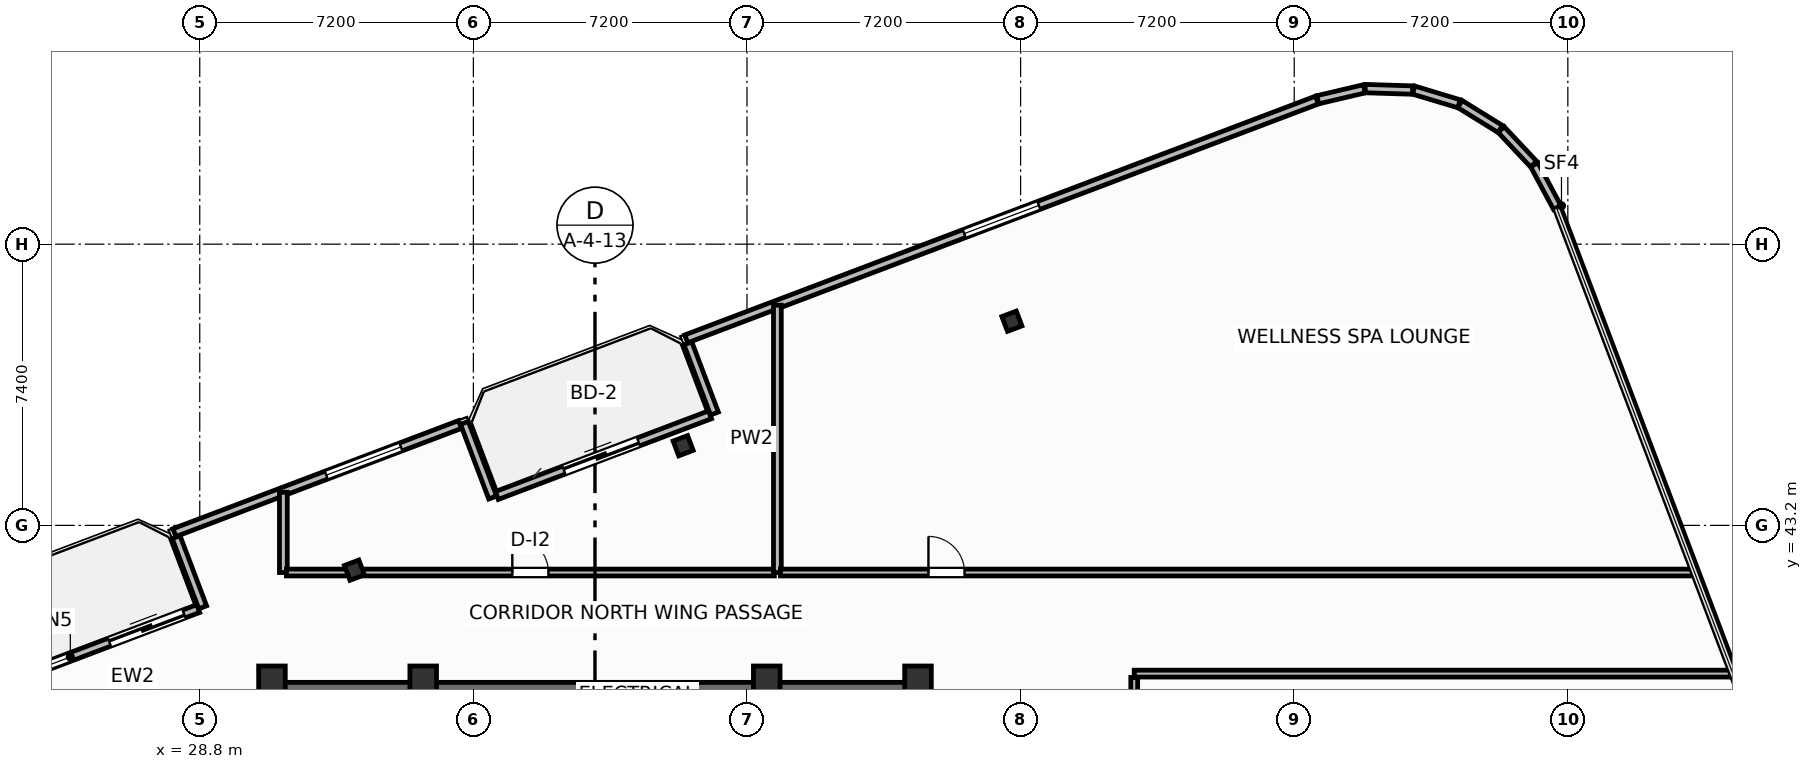
"""IFC4 building model, lengths in metres.
Left out: names, types, materials, properties, quantities, classifications, styles, units other than length and angle.
Written with IfcOpenShell. Run it as: python <this file> out.ifc"""

import sys

from ifc_helpers import new_model, si_unit, direction, frame, frame_2d, origin, origin_2d, place, context, subcontext, project, spatial, rectangle, i_section, extrude, element, fill, save


model = new_model("IFC4")
c1 = context("Model", 3, precision=1e-05, world=origin(), true_north=direction((0.0, 1.0)))
c2 = subcontext(c1, "Body", "Model", "MODEL_VIEW")
j1 = project(units=[si_unit("LENGTHUNIT", "METRE"), si_unit("PLANEANGLEUNIT", "RADIAN")], contexts=[c1])
p1 = place(None, origin())
s1 = spatial("IfcSite", under=j1, at=p1, CompositionType="ELEMENT")
p2 = place(p1, origin())
s2 = spatial("IfcBuilding", under=s1, at=p2, CompositionType="ELEMENT")
p3 = place(p2, frame((0.0, 0.0, 246.0)))
s3 = spatial("IfcBuildingStorey", under=s2, at=p3, CompositionType="ELEMENT", Elevation=246.0)
for number, where, z_axis, x_axis in (
    (1, (30.7, 39.05, 0.0), (0.0, 0.0, 1.0), (1.0, 0.0, 0.0)),
    (2, (34.68, 39.05, 0.0), (0.0, 0.0, 1.0), (1.0, 0.0, 0.0)),
    (3, (43.72, 39.05, 0.0), (0.0, 0.0, 1.0), (1.0, 0.0, 0.0)),
    (4, (47.7, 39.05, 0.0), (0.0, 0.0, 1.0), (1.0, 0.0, 0.0)),
):
    element("IfcColumn", number, at=place(p3, frame(where, z_axis=z_axis, x_axis=x_axis)), inside=s3, PredefinedType="COLUMN", context=c2, shape_type="SweptSolid", body=[
        extrude(rectangle(XDim=0.7, YDim=0.9, at=origin_2d()), origin(), (0.0, 0.0, 1.0), 3.7),
    ])
p4 = place(p3, frame((30.48, 38.745, 0.0), z_axis=(0.0, 0.0, 1.0), x_axis=(1.0, 0.0, 0.0)))
e5 = element("IfcWall", 5, at=p4, inside=s3, PredefinedType="SHEAR", context=c2, shape_type="SweptSolid", body=[
    extrude(rectangle(XDim=17.44, YDim=0.65, at=frame_2d((8.72, 0.0))), origin(), (0.0, 0.0, 1.0), 3.45),
])
for number, where, z_axis, x_axis in (
    (6, (50.171, 48.572, 0.0), (0.0, 0.0, 1.0), (0.935, 0.354, 0.0)),
    (7, (41.52, 45.297, 0.0), (0.0, 0.0, 1.0), (0.935, 0.354, 0.0)),
    (8, (32.869, 42.022, 0.0), (0.0, 0.0, 1.0), (0.935, 0.354, 0.0)),
):
    element("IfcColumn", number, at=place(p3, frame(where, z_axis=z_axis, x_axis=x_axis)), inside=s3, PredefinedType="COLUMN", context=c2, shape_type="SweptSolid", body=[
        extrude(i_section(OverallWidth=0.406, OverallDepth=0.416, WebThickness=0.03, FlangeThickness=0.048, FilletRadius=0.025, at=origin_2d()), origin(), (0.0, 0.0, 1.0), 3.7),
    ])
p5 = place(p3, frame((23.149, 38.887, 0.0), z_axis=(0.0, 0.0, 1.0), x_axis=(0.9352192676, 0.354069091436, 0.0)))
e9 = element("IfcWall", 9, at=p5, inside=s3, PredefinedType="SOLIDWALL", context=c2, shape_type="SweptSolid", body=[
    extrude(rectangle(XDim=6.0, YDim=0.22, at=frame_2d((3.0, 0.0))), origin(), (0.0, 0.0, 1.0), 2.73),
])
p6 = place(p5, frame((3.5, 0.0, 0.0)))
e10 = element("IfcOpeningElement", 10, at=p6, cuts=e9, PredefinedType="OPENING", context=c2, shape_type="SweptSolid", body=[
    extrude(rectangle(XDim=2.1, YDim=2.3, at=frame_2d((1.05, 1.15))), frame((0.0, 0.12, 0.0), z_axis=(0.0, -1.0, 0.0), x_axis=(1.0, 0.0, 0.0)), (0.0, 0.0, 1.0), 0.24),
])
p7 = place(p5, frame((0.55, 0.0, 0.75)))
e11 = element("IfcOpeningElement", 11, at=p7, cuts=e9, PredefinedType="OPENING", context=c2, shape_type="SweptSolid", body=[
    extrude(rectangle(XDim=1.85, YDim=1.75, at=frame_2d((0.925, 0.875))), frame((0.0, 0.12, 0.0), z_axis=(0.0, -1.0, 0.0), x_axis=(1.0, 0.0, 0.0)), (0.0, 0.0, 1.0), 0.24),
])
p8 = place(p3, frame((36.617, 43.986, 0.0), z_axis=(0.0, 0.0, 1.0), x_axis=(0.935227640088, 0.354046976001, 0.0)))
e12 = element("IfcWall", 12, at=p8, inside=s3, PredefinedType="SOLIDWALL", context=c2, shape_type="SweptSolid", body=[
    extrude(rectangle(XDim=6.0, YDim=0.22, at=frame_2d((3.0, 0.0))), origin(), (0.0, 0.0, 1.0), 2.73),
])
p9 = place(p8, frame((1.888, 0.0, 0.0)))
e13 = element("IfcOpeningElement", 13, at=p9, cuts=e12, PredefinedType="OPENING", context=c2, shape_type="SweptSolid", body=[
    extrude(rectangle(XDim=2.1, YDim=2.3, at=frame_2d((1.05, 1.15))), frame((0.0, 0.12, 0.0), z_axis=(0.0, -1.0, 0.0), x_axis=(1.0, 0.0, 0.0)), (0.0, 0.0, 1.0), 0.24),
])
p10 = place(p3, frame((64.519, 51.566, 0.0), z_axis=(0.0, 0.0, 1.0), x_axis=(-0.473093575122, 0.881012184466, 0.0)))
e14 = element("IfcWall", 14, at=p10, inside=s3, PredefinedType="SOLIDWALL", context=c2, shape_type="SweptSolid", body=[
    extrude(rectangle(XDim=1.274, YDim=0.22, at=frame_2d((0.637, 0.0))), origin(), (0.0, 0.0, 1.0), 2.73),
])
for number, where, z_axis, x_axis in (
    (15, (63.899, 52.706, 0.0), (0.0, 0.0, 1.0), (-0.685, 0.729, 0.0)),
    (16, (63.023, 53.629, 0.0), (0.0, 0.0, 1.0), (-0.85, 0.526, 0.0)),
):
    element("IfcWall", number, at=place(p3, frame(where, z_axis=z_axis, x_axis=x_axis)), inside=s3, PredefinedType="SOLIDWALL", context=c2, shape_type="SweptSolid", body=[
        extrude(rectangle(XDim=1.249, YDim=0.22, at=frame_2d((0.625, 0.0))), origin(), (0.0, 0.0, 1.0), 2.73),
    ])
for number, where, z_axis, x_axis in (
    (17, (61.937, 54.294, 0.0), (0.0, 0.0, 1.0), (-0.958, 0.288, 0.0)),
    (18, (60.717, 54.655, 0.0), (0.0, 0.0, 1.0), (-1.0, 0.031, 0.0)),
):
    element("IfcWall", number, at=place(p3, frame(where, z_axis=z_axis, x_axis=x_axis)), inside=s3, PredefinedType="SOLIDWALL", context=c2, shape_type="SweptSolid", body=[
        extrude(rectangle(XDim=1.249, YDim=0.22, at=frame_2d((0.624, 0.0))), origin(), (0.0, 0.0, 1.0), 2.73),
    ])
p11 = place(p3, frame((59.444, 54.688, 0.0), z_axis=(0.0, 0.0, 1.0), x_axis=(-0.973409523464, -0.229071821989, 0.0)))
e19 = element("IfcWall", 19, at=p11, inside=s3, PredefinedType="SOLIDWALL", context=c2, shape_type="SweptSolid", body=[
    extrude(rectangle(XDim=1.257, YDim=0.22, at=frame_2d((0.628, 0.0))), origin(), (0.0, 0.0, 1.0), 2.73),
])
p12 = place(p3, frame((58.198, 54.391, 0.0), z_axis=(0.0, 0.0, 1.0), x_axis=(-0.935223849772, -0.354056988094, 0.0)))
e20 = element("IfcWall", 20, at=p12, inside=s3, PredefinedType="SOLIDWALL", context=c2, shape_type="SweptSolid", body=[
    extrude(rectangle(XDim=17.747, YDim=0.22, at=frame_2d((8.874, 0.0))), origin(), (0.0, 0.0, 1.0), 2.73),
])
p13 = place(p12, frame((7.823, 0.0, 0.8)))
e21 = element("IfcOpeningElement", 21, at=p13, cuts=e20, PredefinedType="OPENING", context=c2, shape_type="SweptSolid", body=[
    extrude(rectangle(XDim=2.1, YDim=1.75, at=frame_2d((1.05, 0.875))), frame((0.0, 0.12, 0.0), z_axis=(0.0, -1.0, 0.0), x_axis=(1.0, 0.0, 0.0)), (0.0, 0.0, 1.0), 0.24),
])
p14 = place(p3, frame((41.645, 47.99, 0.0), z_axis=(0.0, 0.0, 1.0), x_axis=(0.354020680661, -0.935237594232, 0.0)))
e22 = element("IfcWall", 22, at=p14, inside=s3, PredefinedType="SOLIDWALL", context=c2, shape_type="SweptSolid", body=[
    extrude(rectangle(XDim=1.975, YDim=0.22, at=frame_2d((0.988, 0.0))), origin(), (0.0, 0.0, 1.0), 2.73),
])
p15 = place(p3, frame((36.508, 43.934, 0.0), z_axis=(0.0, 0.0, 1.0), x_axis=(-0.354128469405, 0.935196785258, 0.0)))
e23 = element("IfcWall", 23, at=p15, inside=s3, PredefinedType="SOLIDWALL", context=c2, shape_type="SweptSolid", body=[
    extrude(rectangle(XDim=2.1, YDim=0.22, at=frame_2d((1.05, 0.0))), origin(), (0.0, 0.0, 1.0), 2.73),
])
p16 = place(p3, frame((35.648, 45.854, 0.0), z_axis=(0.0, 0.0, 1.0), x_axis=(-0.935230796934, -0.354038636968, 0.0)))
e24 = element("IfcWall", 24, at=p16, inside=s3, PredefinedType="SOLIDWALL", context=c2, shape_type="SweptSolid", body=[
    extrude(rectangle(XDim=8.035, YDim=0.22, at=frame_2d((4.018, 0.0))), origin(), (0.0, 0.0, 1.0), 2.73),
])
p17 = place(p16, frame((1.662, 0.0, 0.8)))
e25 = element("IfcOpeningElement", 25, at=p17, cuts=e24, PredefinedType="OPENING", context=c2, shape_type="SweptSolid", body=[
    extrude(rectangle(XDim=2.1, YDim=1.75, at=frame_2d((1.05, 0.875))), frame((0.0, 0.12, 0.0), z_axis=(0.0, -1.0, 0.0), x_axis=(1.0, 0.0, 0.0)), (0.0, 0.0, 1.0), 0.24),
])
p18 = place(p3, frame((28.177, 42.892, 0.0), z_axis=(0.0, 0.0, 1.0), x_axis=(0.354061611705, -0.935222099352, 0.0)))
e26 = element("IfcWall", 26, at=p18, inside=s3, PredefinedType="SOLIDWALL", context=c2, shape_type="SweptSolid", body=[
    extrude(rectangle(XDim=1.975, YDim=0.22, at=frame_2d((0.987, 0.0))), origin(), (0.0, 0.0, 1.0), 2.73),
])
p19 = place(p3, frame((31.0, 41.96, 0.0), z_axis=(0.0, 0.0, 1.0), x_axis=(0.0, 1.0, 0.0)))
e27 = element("IfcWall", 27, at=p19, inside=s3, PredefinedType="PARTITIONING", context=c2, shape_type="SweptSolid", body=[
    extrude(rectangle(XDim=2.113, YDim=0.205, at=frame_2d((1.056, 0.0))), origin(), (0.0, 0.0, 1.0), 3.45),
])
p20 = place(p3, frame((31.08, 41.96, 0.0), z_axis=(0.0, 0.0, 1.0), x_axis=(1.0, 0.0, 0.0)))
e28 = element("IfcWall", 28, at=p20, inside=s3, PredefinedType="PARTITIONING", context=c2, shape_type="SweptSolid", body=[
    extrude(rectangle(XDim=12.84, YDim=0.18, at=frame_2d((6.42, 0.0))), origin(), (0.0, 0.0, 1.0), 3.018),
])
p21 = place(p20, frame((5.945, 0.0, 0.0)))
e29 = element("IfcOpeningElement", 29, at=p21, cuts=e28, PredefinedType="OPENING", context=c2, shape_type="SweptSolid", body=[
    extrude(rectangle(XDim=0.95, YDim=2.05, at=frame_2d((0.475, 1.025))), frame((0.0, 0.1, 0.0), z_axis=(0.0, -1.0, 0.0), x_axis=(1.0, 0.0, 0.0)), (0.0, 0.0, 1.0), 0.2),
])
p22 = place(p3, frame((44.0, 41.96, 0.0), z_axis=(0.0, 0.0, 1.0), x_axis=(0.0, 1.0, 0.0)))
e30 = element("IfcWall", 30, at=p22, inside=s3, PredefinedType="PARTITIONING", context=c2, shape_type="SweptSolid", body=[
    extrude(rectangle(XDim=7.034, YDim=0.205, at=frame_2d((3.517, 0.0))), origin(), (0.0, 0.0, 1.0), 3.45),
])
p23 = place(p3, frame((44.08, 41.96, 0.0), z_axis=(0.0, 0.0, 1.0), x_axis=(1.0, 0.0, 0.0)))
e31 = element("IfcWall", 31, at=p23, inside=s3, PredefinedType="PARTITIONING", context=c2, shape_type="SweptSolid", body=[
    extrude(rectangle(XDim=24.016, YDim=0.18, at=frame_2d((12.008, 0.0))), origin(), (0.0, 0.0, 1.0), 3.45),
])
p24 = place(p23, frame((3.895, 0.0, 0.0)))
e32 = element("IfcOpeningElement", 32, at=p24, cuts=e31, PredefinedType="OPENING", context=c2, shape_type="SweptSolid", body=[
    extrude(rectangle(XDim=0.95, YDim=2.05, at=frame_2d((0.475, 1.025))), frame((0.0, 0.1, 0.0), z_axis=(0.0, -1.0, 0.0), x_axis=(1.0, 0.0, 0.0)), (0.0, 0.0, 1.0), 0.2),
])
p25 = place(p3, frame((53.39, 27.53, 0.0), z_axis=(0.0, 0.0, 1.0), x_axis=(0.0, 1.0, 0.0)))
e33 = element("IfcWall", 33, at=p25, inside=s3, PredefinedType="PARTITIONING", context=c2, shape_type="SweptSolid", body=[
    extrude(rectangle(XDim=11.67, YDim=0.18, at=frame_2d((5.835, 0.0))), origin(), (0.0, 0.0, 1.0), 3.45),
])
p26 = place(p25, frame((5.8, 0.0, 0.0)))
e34 = element("IfcOpeningElement", 34, at=p26, cuts=e33, PredefinedType="OPENING", context=c2, shape_type="SweptSolid", body=[
    extrude(rectangle(XDim=0.92, YDim=2.05, at=frame_2d((0.46, 1.025))), frame((0.0, 0.1, 0.0), z_axis=(0.0, -1.0, 0.0), x_axis=(1.0, 0.0, 0.0)), (0.0, 0.0, 1.0), 0.2),
])
p27 = place(p3, frame((53.39, 39.3, 0.0), z_axis=(0.0, 0.0, 1.0), x_axis=(1.0, 0.0, 0.0)))
e35 = element("IfcWall", 35, at=p27, inside=s3, PredefinedType="PARTITIONING", context=c2, shape_type="SweptSolid", body=[
    extrude(rectangle(XDim=15.713, YDim=0.18, at=frame_2d((7.856, 0.0))), origin(), (0.0, 0.0, 1.0), 3.45),
])
p28 = place(p6, origin())
e36 = element("IfcDoor", 36, at=p28, inside=s3, OperationType="SLIDING_TO_LEFT", PredefinedType="DOOR", context=c2, shape_type="SweptSolid", body=[
    extrude(rectangle(XDim=2.1, YDim=2.3, at=frame_2d((1.05, 1.15))), frame((0.0, 0.025, 0.0), z_axis=(0.0, -1.0, 0.0), x_axis=(1.0, 0.0, 0.0)), (0.0, 0.0, 1.0), 0.05),
])
fill(e10, e36)
p29 = place(p7, origin())
e37 = element("IfcWindow", 37, at=p29, inside=s3, PartitioningType="SINGLE_PANEL", PredefinedType="WINDOW", context=c2, shape_type="SweptSolid", body=[
    extrude(rectangle(XDim=1.85, YDim=1.75, at=frame_2d((0.925, 0.875))), frame((0.0, 0.03, 0.0), z_axis=(0.0, -1.0, 0.0), x_axis=(1.0, 0.0, 0.0)), (0.0, 0.0, 1.0), 0.06),
])
fill(e11, e37)
p30 = place(p9, origin())
e38 = element("IfcDoor", 38, at=p30, inside=s3, OperationType="SLIDING_TO_LEFT", PredefinedType="DOOR", context=c2, shape_type="SweptSolid", body=[
    extrude(rectangle(XDim=2.1, YDim=2.3, at=frame_2d((1.05, 1.15))), frame((0.0, 0.025, 0.0), z_axis=(0.0, -1.0, 0.0), x_axis=(1.0, 0.0, 0.0)), (0.0, 0.0, 1.0), 0.05),
])
fill(e13, e38)
p31 = place(p13, origin())
e39 = element("IfcWindow", 39, at=p31, inside=s3, PartitioningType="SINGLE_PANEL", PredefinedType="WINDOW", context=c2, shape_type="SweptSolid", body=[
    extrude(rectangle(XDim=2.1, YDim=1.75, at=frame_2d((1.05, 0.875))), frame((0.0, 0.03, 0.0), z_axis=(0.0, -1.0, 0.0), x_axis=(1.0, 0.0, 0.0)), (0.0, 0.0, 1.0), 0.06),
])
fill(e21, e39)
p32 = place(p17, origin())
e40 = element("IfcWindow", 40, at=p32, inside=s3, PartitioningType="SINGLE_PANEL", PredefinedType="WINDOW", context=c2, shape_type="SweptSolid", body=[
    extrude(rectangle(XDim=2.1, YDim=1.75, at=frame_2d((1.05, 0.875))), frame((0.0, 0.03, 0.0), z_axis=(0.0, -1.0, 0.0), x_axis=(1.0, 0.0, 0.0)), (0.0, 0.0, 1.0), 0.06),
])
fill(e25, e40)
p33 = place(p21, origin())
e41 = element("IfcDoor", 41, at=p33, inside=s3, OperationType="SINGLE_SWING_LEFT", PredefinedType="DOOR", context=c2, shape_type="SweptSolid", body=[
    extrude(rectangle(XDim=0.95, YDim=2.05, at=frame_2d((0.475, 1.025))), frame((0.0, 0.025, 0.0), z_axis=(0.0, -1.0, 0.0), x_axis=(1.0, 0.0, 0.0)), (0.0, 0.0, 1.0), 0.05),
])
fill(e29, e41)
p34 = place(p24, origin())
e42 = element("IfcDoor", 42, at=p34, inside=s3, OperationType="SINGLE_SWING_LEFT", PredefinedType="DOOR", context=c2, shape_type="SweptSolid", body=[
    extrude(rectangle(XDim=0.95, YDim=2.05, at=frame_2d((0.475, 1.025))), frame((0.0, 0.025, 0.0), z_axis=(0.0, -1.0, 0.0), x_axis=(1.0, 0.0, 0.0)), (0.0, 0.0, 1.0), 0.05),
])
fill(e32, e42)
save(model, sys.argv[1])
